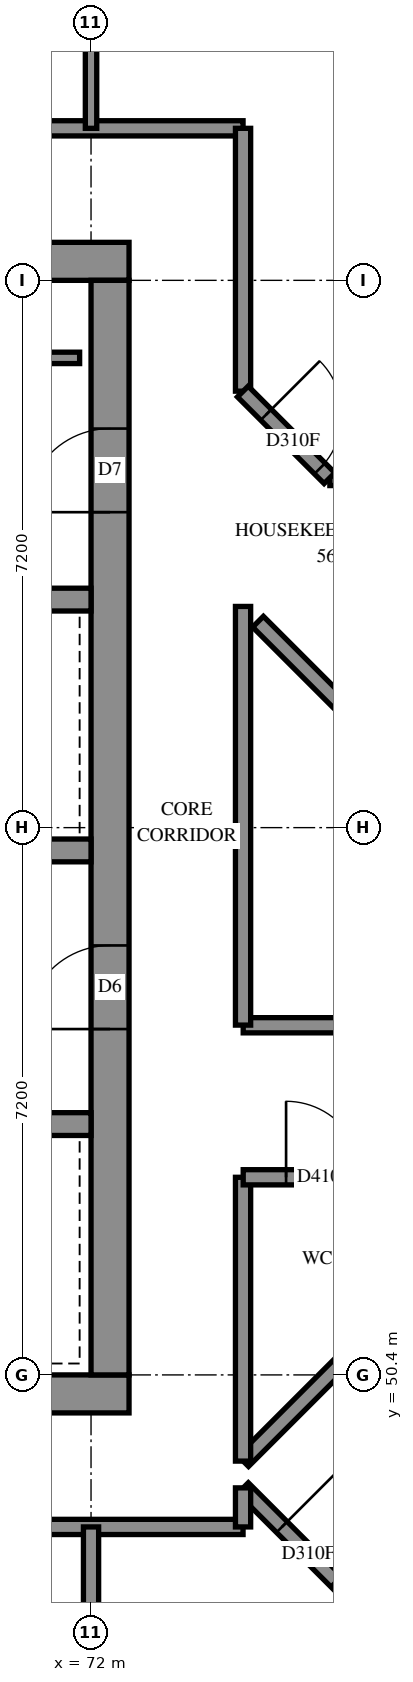
"""IFC4 building model, lengths in metres.
Left out: names, types, materials, properties, quantities, classifications, styles, units other than length and angle.
Written with IfcOpenShell. Run it as: python <this file> out.ifc"""

import sys

from ifc_helpers import new_model, si_unit, direction, frame, frame_2d, origin, place, context, subcontext, project, spatial, rectangle, extrude, element, fill, save


model = new_model("IFC4")
c1 = context("Model", 3, precision=1e-05, world=origin(), true_north=direction((0.0, 1.0)))
c2 = subcontext(c1, "Body", "Model", "MODEL_VIEW")
j1 = project(units=[si_unit("LENGTHUNIT", "METRE"), si_unit("PLANEANGLEUNIT", "RADIAN")], contexts=[c1])
p1 = place(None, origin())
s1 = spatial("IfcSite", under=j1, at=p1, CompositionType="ELEMENT")
p2 = place(p1, origin())
s2 = spatial("IfcBuilding", under=s1, at=p2, CompositionType="ELEMENT")
p3 = place(p2, frame((0.0, 0.0, 206.6)))
s3 = spatial("IfcBuildingStorey", under=s2, at=p3, CompositionType="ELEMENT", Elevation=206.6)
p4 = place(p3, frame((57.1, 50.15, -0.3), z_axis=(0.0, 0.0, 1.0), x_axis=(1.0, 0.0, 0.0)))
e1 = element("IfcWall", 1, at=p4, inside=s3, PredefinedType="SHEAR", context=c2, shape_type="SweptSolid", body=[
    extrude(rectangle(XDim=15.4, YDim=0.5, at=frame_2d((7.7, 0.0))), origin(), (0.0, 0.0, 1.0), 2.7),
])
p5 = place(p3, frame((57.1, 65.05, -0.3), z_axis=(0.0, 0.0, 1.0), x_axis=(1.0, 0.0, 0.0)))
e2 = element("IfcWall", 2, at=p5, inside=s3, PredefinedType="SHEAR", context=c2, shape_type="SweptSolid", body=[
    extrude(rectangle(XDim=15.4, YDim=0.5, at=frame_2d((7.7, 0.0))), origin(), (0.0, 0.0, 1.0), 2.7),
])
p6 = place(p5, frame((10.5, 0.0, 0.3)))
e3 = element("IfcOpeningElement", 3, at=p6, cuts=e2, PredefinedType="OPENING", context=c2, shape_type="SweptSolid", body=[
    extrude(rectangle(XDim=0.8, YDim=2.1, at=frame_2d((0.4, 1.05))), frame((0.0, 0.26, 0.0), z_axis=(0.0, -1.0, 0.0), x_axis=(1.0, 0.0, 0.0)), (0.0, 0.0, 1.0), 0.52),
])
p7 = place(p3, frame((72.25, 50.4, -0.3), z_axis=(0.0, 0.0, 1.0), x_axis=(0.0, 1.0, 0.0)))
e4 = element("IfcWall", 4, at=p7, inside=s3, PredefinedType="SHEAR", context=c2, shape_type="SweptSolid", body=[
    extrude(rectangle(XDim=14.4, YDim=0.5, at=frame_2d((7.2, 0.0))), origin(), (0.0, 0.0, 1.0), 2.7),
])
p8 = place(p7, frame((4.55, 0.0, 0.3)))
e5 = element("IfcOpeningElement", 5, at=p8, cuts=e4, PredefinedType="OPENING", context=c2, shape_type="SweptSolid", body=[
    extrude(rectangle(XDim=1.1, YDim=2.1, at=frame_2d((0.55, 1.05))), frame((0.0, 0.26, 0.0), z_axis=(0.0, -1.0, 0.0), x_axis=(1.0, 0.0, 0.0)), (0.0, 0.0, 1.0), 0.52),
])
p9 = place(p7, frame((11.35, 0.0, 0.3)))
e6 = element("IfcOpeningElement", 6, at=p9, cuts=e4, PredefinedType="OPENING", context=c2, shape_type="SweptSolid", body=[
    extrude(rectangle(XDim=1.1, YDim=2.1, at=frame_2d((0.55, 1.05))), frame((0.0, 0.26, 0.0), z_axis=(0.0, -1.0, 0.0), x_axis=(1.0, 0.0, 0.0)), (0.0, 0.0, 1.0), 0.52),
])
p10 = place(p3, frame((57.6, 53.7, 0.0), z_axis=(0.0, 0.0, 1.0), x_axis=(1.0, 0.0, 0.0)))
e7 = element("IfcWall", 7, at=p10, inside=s3, PredefinedType="SOLIDWALL", context=c2, shape_type="SweptSolid", body=[
    extrude(rectangle(XDim=14.4, YDim=0.3, at=frame_2d((7.2, 0.0))), origin(), (0.0, 0.0, 1.0), 3.1),
])
p11 = place(p10, frame((1.35, 0.0, 0.0)))
e8 = element("IfcOpeningElement", 8, at=p11, cuts=e7, PredefinedType="OPENING", context=c2, shape_type="SweptSolid", body=[
    extrude(rectangle(XDim=0.9, YDim=2.1, at=frame_2d((0.45, 1.05))), frame((0.0, 0.16, 0.0), z_axis=(0.0, -1.0, 0.0), x_axis=(1.0, 0.0, 0.0)), (0.0, 0.0, 1.0), 0.32),
])
p12 = place(p10, frame((4.95, 0.0, 0.0)))
e9 = element("IfcOpeningElement", 9, at=p12, cuts=e7, PredefinedType="OPENING", context=c2, shape_type="SweptSolid", body=[
    extrude(rectangle(XDim=0.9, YDim=2.1, at=frame_2d((0.45, 1.05))), frame((0.0, 0.16, 0.0), z_axis=(0.0, -1.0, 0.0), x_axis=(1.0, 0.0, 0.0)), (0.0, 0.0, 1.0), 0.32),
])
p13 = place(p10, frame((8.55, 0.0, 0.0)))
e10 = element("IfcOpeningElement", 10, at=p13, cuts=e7, PredefinedType="OPENING", context=c2, shape_type="SweptSolid", body=[
    extrude(rectangle(XDim=0.9, YDim=2.1, at=frame_2d((0.45, 1.05))), frame((0.0, 0.16, 0.0), z_axis=(0.0, -1.0, 0.0), x_axis=(1.0, 0.0, 0.0)), (0.0, 0.0, 1.0), 0.32),
])
p14 = place(p10, frame((12.05, 0.0, 0.0)))
e11 = element("IfcOpeningElement", 11, at=p14, cuts=e7, PredefinedType="OPENING", context=c2, shape_type="SweptSolid", body=[
    extrude(rectangle(XDim=1.1, YDim=2.1, at=frame_2d((0.55, 1.05))), frame((0.0, 0.16, 0.0), z_axis=(0.0, -1.0, 0.0), x_axis=(1.0, 0.0, 0.0)), (0.0, 0.0, 1.0), 0.32),
])
p15 = place(p3, frame((57.6, 57.3, 0.0), z_axis=(0.0, 0.0, 1.0), x_axis=(1.0, 0.0, 0.0)))
e12 = element("IfcWall", 12, at=p15, inside=s3, PredefinedType="SOLIDWALL", context=c2, shape_type="SweptSolid", body=[
    extrude(rectangle(XDim=14.4, YDim=0.3, at=frame_2d((7.2, 0.0))), origin(), (0.0, 0.0, 1.0), 3.1),
])
p16 = place(p15, frame((1.25, 0.0, 0.0)))
e13 = element("IfcOpeningElement", 13, at=p16, cuts=e12, PredefinedType="OPENING", context=c2, shape_type="SweptSolid", body=[
    extrude(rectangle(XDim=1.1, YDim=2.1, at=frame_2d((0.55, 1.05))), frame((0.0, 0.16, 0.0), z_axis=(0.0, -1.0, 0.0), x_axis=(1.0, 0.0, 0.0)), (0.0, 0.0, 1.0), 0.32),
])
p17 = place(p15, frame((4.85, 0.0, 0.0)))
e14 = element("IfcOpeningElement", 14, at=p17, cuts=e12, PredefinedType="OPENING", context=c2, shape_type="SweptSolid", body=[
    extrude(rectangle(XDim=1.1, YDim=2.1, at=frame_2d((0.55, 1.05))), frame((0.0, 0.16, 0.0), z_axis=(0.0, -1.0, 0.0), x_axis=(1.0, 0.0, 0.0)), (0.0, 0.0, 1.0), 0.32),
])
p18 = place(p15, frame((8.45, 0.0, 0.0)))
e15 = element("IfcOpeningElement", 15, at=p18, cuts=e12, PredefinedType="OPENING", context=c2, shape_type="SweptSolid", body=[
    extrude(rectangle(XDim=1.1, YDim=2.1, at=frame_2d((0.55, 1.05))), frame((0.0, 0.16, 0.0), z_axis=(0.0, -1.0, 0.0), x_axis=(1.0, 0.0, 0.0)), (0.0, 0.0, 1.0), 0.32),
])
p19 = place(p15, frame((12.05, 0.0, 0.0)))
e16 = element("IfcOpeningElement", 16, at=p19, cuts=e12, PredefinedType="OPENING", context=c2, shape_type="SweptSolid", body=[
    extrude(rectangle(XDim=1.1, YDim=2.1, at=frame_2d((0.55, 1.05))), frame((0.0, 0.16, 0.0), z_axis=(0.0, -1.0, 0.0), x_axis=(1.0, 0.0, 0.0)), (0.0, 0.0, 1.0), 0.32),
])
p20 = place(p3, frame((64.8, 60.6, 0.0), z_axis=(0.0, 0.0, 1.0), x_axis=(1.0, 0.0, 0.0)))
e17 = element("IfcWall", 17, at=p20, inside=s3, PredefinedType="SOLIDWALL", context=c2, shape_type="SweptSolid", body=[
    extrude(rectangle(XDim=7.2, YDim=0.3, at=frame_2d((3.6, 0.0))), origin(), (0.0, 0.0, 1.0), 3.1),
])
p21 = place(p3, frame((64.95, 63.78, 0.0), z_axis=(0.0, 0.0, 1.0), x_axis=(1.0, 0.0, 0.0)))
e18 = element("IfcWall", 18, at=p21, inside=s3, PredefinedType="PARTITIONING", context=c2, shape_type="SweptSolid", body=[
    extrude(rectangle(XDim=6.9, YDim=0.15, at=frame_2d((3.45, 0.0))), origin(), (0.0, 0.0, 1.0), 3.1),
])
p22 = place(p3, frame((55.6, 48.4, 0.0), z_axis=(0.0, 0.0, 1.0), x_axis=(1.0, 0.0, 0.0)))
e19 = element("IfcWall", 19, at=p22, inside=s3, PredefinedType="PARTITIONING", context=c2, shape_type="SweptSolid", body=[
    extrude(rectangle(XDim=18.4, YDim=0.2, at=frame_2d((9.2, 0.0))), origin(), (0.0, 0.0, 1.0), 3.1),
])
p23 = place(p22, frame((5.862, 0.0, 0.0)))
e20 = element("IfcOpeningElement", 20, at=p23, cuts=e19, PredefinedType="OPENING", context=c2, shape_type="SweptSolid", body=[
    extrude(rectangle(XDim=1.0, YDim=2.1, at=frame_2d((0.5, 1.05))), frame((0.0, 0.11, 0.0), z_axis=(0.0, -1.0, 0.0), x_axis=(1.0, 0.0, 0.0)), (0.0, 0.0, 1.0), 0.22),
])
p24 = place(p22, frame((13.099, 0.0, 0.0)))
e21 = element("IfcOpeningElement", 21, at=p24, cuts=e19, PredefinedType="OPENING", context=c2, shape_type="SweptSolid", body=[
    extrude(rectangle(XDim=0.9, YDim=2.1, at=frame_2d((0.45, 1.05))), frame((0.0, 0.11, 0.0), z_axis=(0.0, -1.0, 0.0), x_axis=(1.0, 0.0, 0.0)), (0.0, 0.0, 1.0), 0.22),
])
p25 = place(p3, frame((55.6, 66.8, 0.0), z_axis=(0.0, 0.0, 1.0), x_axis=(1.0, 0.0, 0.0)))
e22 = element("IfcWall", 22, at=p25, inside=s3, PredefinedType="PARTITIONING", context=c2, shape_type="SweptSolid", body=[
    extrude(rectangle(XDim=18.4, YDim=0.2, at=frame_2d((9.2, 0.0))), origin(), (0.0, 0.0, 1.0), 3.1),
])
p26 = place(p25, frame((4.25, 0.0, 0.0)))
e23 = element("IfcOpeningElement", 23, at=p26, cuts=e22, PredefinedType="OPENING", context=c2, shape_type="SweptSolid", body=[
    extrude(rectangle(XDim=0.9, YDim=2.1, at=frame_2d((0.45, 1.05))), frame((0.0, 0.11, 0.0), z_axis=(0.0, -1.0, 0.0), x_axis=(1.0, 0.0, 0.0)), (0.0, 0.0, 1.0), 0.22),
])
p27 = place(p25, frame((7.974, 0.0, 0.0)))
e24 = element("IfcOpeningElement", 24, at=p27, cuts=e22, PredefinedType="OPENING", context=c2, shape_type="SweptSolid", body=[
    extrude(rectangle(XDim=1.0, YDim=2.1, at=frame_2d((0.5, 1.05))), frame((0.0, 0.11, 0.0), z_axis=(0.0, -1.0, 0.0), x_axis=(1.0, 0.0, 0.0)), (0.0, 0.0, 1.0), 0.22),
])
p28 = place(p25, frame((13.2, 0.0, 0.0)))
e25 = element("IfcOpeningElement", 25, at=p28, cuts=e22, PredefinedType="OPENING", context=c2, shape_type="SweptSolid", body=[
    extrude(rectangle(XDim=0.9, YDim=2.1, at=frame_2d((0.45, 1.05))), frame((0.0, 0.11, 0.0), z_axis=(0.0, -1.0, 0.0), x_axis=(1.0, 0.0, 0.0)), (0.0, 0.0, 1.0), 0.22),
])
p29 = place(p3, frame((73.999, 48.911, 0.0), z_axis=(0.0, 0.0, 1.0), x_axis=(0.7071067812, -0.7071067812, 0.0)))
e26 = element("IfcWall", 26, at=p29, inside=s3, PredefinedType="PARTITIONING", context=c2, shape_type="SweptSolid", body=[
    extrude(rectangle(XDim=5.745, YDim=0.2, at=frame_2d((2.872, 0.0))), origin(), (0.0, 0.0, 1.0), 3.1),
])
p30 = place(p29, frame((0.724, 0.0, 0.0)))
e27 = element("IfcOpeningElement", 27, at=p30, cuts=e26, PredefinedType="OPENING", context=c2, shape_type="SweptSolid", body=[
    extrude(rectangle(XDim=1.0, YDim=2.1, at=frame_2d((0.5, 1.05))), frame((0.0, 0.11, 0.0), z_axis=(0.0, -1.0, 0.0), x_axis=(1.0, 0.0, 0.0)), (0.0, 0.0, 1.0), 0.22),
])
p31 = place(p3, frame((74.002, 55.0, 0.0), z_axis=(0.0, 0.0, 1.0), x_axis=(1.0, 0.0, 0.0)))
e28 = element("IfcWall", 28, at=p31, inside=s3, PredefinedType="PARTITIONING", context=c2, shape_type="SweptSolid", body=[
    extrude(rectangle(XDim=5.508, YDim=0.2, at=frame_2d((2.754, 0.0))), origin(), (0.0, 0.0, 1.0), 3.1),
])
p32 = place(p31, frame((1.51, 0.0, 0.0)))
e29 = element("IfcOpeningElement", 29, at=p32, cuts=e28, PredefinedType="OPENING", context=c2, shape_type="SweptSolid", body=[
    extrude(rectangle(XDim=1.0, YDim=2.1, at=frame_2d((0.5, 1.05))), frame((0.0, 0.11, 0.0), z_axis=(0.0, -1.0, 0.0), x_axis=(1.0, 0.0, 0.0)), (0.0, 0.0, 1.0), 0.22),
])
p33 = place(p3, frame((74.0, 55.002, 0.0), z_axis=(0.0, 0.0, 1.0), x_axis=(0.0, 1.0, 0.0)))
e30 = element("IfcWall", 30, at=p33, inside=s3, PredefinedType="PARTITIONING", context=c2, shape_type="SweptSolid", body=[
    extrude(rectangle(XDim=5.508, YDim=0.2, at=frame_2d((2.754, 0.0))), origin(), (0.0, 0.0, 1.0), 3.1),
])
p34 = place(p3, frame((74.001, 49.267, 0.0), z_axis=(0.0, 0.0, 1.0), x_axis=(0.7071067812, 0.7071067812, 0.0)))
e31 = element("IfcWall", 31, at=p34, inside=s3, PredefinedType="PARTITIONING", context=c2, shape_type="SweptSolid", body=[
    extrude(rectangle(XDim=5.278, YDim=0.2, at=frame_2d((2.639, 0.0))), origin(), (0.0, 0.0, 1.0), 3.1),
])
p35 = place(p3, frame((72.0, 43.6, 0.0), z_axis=(0.0, 0.0, 1.0), x_axis=(0.0, 1.0, 0.0)))
e32 = element("IfcWall", 32, at=p35, inside=s3, PredefinedType="PARTITIONING", context=c2, shape_type="SweptSolid", body=[
    extrude(rectangle(XDim=4.8, YDim=0.2, at=frame_2d((2.4, 0.0))), origin(), (0.0, 0.0, 1.0), 3.1),
])
p36 = place(p3, frame((74.197, 60.309, 0.0), z_axis=(0.0, 0.0, 1.0), x_axis=(0.7071067812, -0.7071067812, 0.0)))
e33 = element("IfcWall", 33, at=p36, inside=s3, PredefinedType="PARTITIONING", context=c2, shape_type="SweptSolid", body=[
    extrude(rectangle(XDim=4.738, YDim=0.2, at=frame_2d((2.369, 0.0))), origin(), (0.0, 0.0, 1.0), 3.1),
])
p37 = place(p3, frame((75.142, 62.2, 0.0), z_axis=(0.0, 0.0, 1.0), x_axis=(1.0, 0.0, 0.0)))
e34 = element("IfcWall", 34, at=p37, inside=s3, PredefinedType="PARTITIONING", context=c2, shape_type="SweptSolid", body=[
    extrude(rectangle(XDim=4.058, YDim=0.2, at=frame_2d((2.029, 0.0))), origin(), (0.0, 0.0, 1.0), 3.1),
])
p38 = place(p37, frame((2.808, 0.0, 0.0)))
e35 = element("IfcOpeningElement", 35, at=p38, cuts=e34, PredefinedType="OPENING", context=c2, shape_type="SweptSolid", body=[
    extrude(rectangle(XDim=0.9, YDim=2.1, at=frame_2d((0.45, 1.05))), frame((0.0, 0.11, 0.0), z_axis=(0.0, -1.0, 0.0), x_axis=(1.0, 0.0, 0.0)), (0.0, 0.0, 1.0), 0.22),
])
p39 = place(p3, frame((74.0, 49.266, 0.0), z_axis=(0.0, 0.0, 1.0), x_axis=(0.0, 1.0, 0.0)))
e36 = element("IfcWall", 36, at=p39, inside=s3, PredefinedType="PARTITIONING", context=c2, shape_type="SweptSolid", body=[
    extrude(rectangle(XDim=3.734, YDim=0.2, at=frame_2d((1.867, 0.0))), origin(), (0.0, 0.0, 1.0), 3.1),
])
p40 = place(p3, frame((74.002, 53.0, 0.0), z_axis=(0.0, 0.0, 1.0), x_axis=(1.0, 0.0, 0.0)))
e37 = element("IfcWall", 37, at=p40, inside=s3, PredefinedType="PARTITIONING", context=c2, shape_type="SweptSolid", body=[
    extrude(rectangle(XDim=3.732, YDim=0.2, at=frame_2d((1.866, 0.0))), origin(), (0.0, 0.0, 1.0), 3.1),
])
p41 = place(p40, frame((0.564, 0.0, 0.0)))
e38 = element("IfcOpeningElement", 38, at=p41, cuts=e37, PredefinedType="OPENING", context=c2, shape_type="SweptSolid", body=[
    extrude(rectangle(XDim=1.0, YDim=2.1, at=frame_2d((0.5, 1.05))), frame((0.0, 0.11, 0.0), z_axis=(0.0, -1.0, 0.0), x_axis=(1.0, 0.0, 0.0)), (0.0, 0.0, 1.0), 0.22),
])
p42 = place(p3, frame((74.0, 63.342, 0.0), z_axis=(0.0, 0.0, 1.0), x_axis=(0.0, 1.0, 0.0)))
e39 = element("IfcWall", 39, at=p42, inside=s3, PredefinedType="PARTITIONING", context=c2, shape_type="SweptSolid", body=[
    extrude(rectangle(XDim=3.458, YDim=0.2, at=frame_2d((1.729, 0.0))), origin(), (0.0, 0.0, 1.0), 3.1),
])
p43 = place(p3, frame((72.0, 66.8, 0.0), z_axis=(0.0, 0.0, 1.0), x_axis=(0.0, 1.0, 0.0)))
e40 = element("IfcWall", 40, at=p43, inside=s3, PredefinedType="PARTITIONING", context=c2, shape_type="SweptSolid", body=[
    extrude(rectangle(XDim=2.4, YDim=0.15, at=frame_2d((1.2, 0.0))), origin(), (0.0, 0.0, 1.0), 3.1),
])
p44 = place(p3, frame((73.997, 63.337, 0.0), z_axis=(0.0, 0.0, 1.0), x_axis=(0.7071067812, -0.7071067812, 0.0)))
e41 = element("IfcWall", 41, at=p44, inside=s3, PredefinedType="PARTITIONING", context=c2, shape_type="SweptSolid", body=[
    extrude(rectangle(XDim=1.612, YDim=0.2, at=frame_2d((0.806, 0.0))), origin(), (0.0, 0.0, 1.0), 3.1),
])
p45 = place(p44, frame((0.432, 0.0, 0.0)))
e42 = element("IfcOpeningElement", 42, at=p45, cuts=e41, PredefinedType="OPENING", context=c2, shape_type="SweptSolid", body=[
    extrude(rectangle(XDim=1.0, YDim=2.1, at=frame_2d((0.5, 1.05))), frame((0.0, 0.11, 0.0), z_axis=(0.0, -1.0, 0.0), x_axis=(1.0, 0.0, 0.0)), (0.0, 0.0, 1.0), 0.22),
])
p46 = place(p3, frame((74.0, 48.4, 0.0), z_axis=(0.0, 0.0, 1.0), x_axis=(0.0, 1.0, 0.0)))
e43 = element("IfcWall", 43, at=p46, inside=s3, PredefinedType="PARTITIONING", context=c2, shape_type="SweptSolid", body=[
    extrude(rectangle(XDim=0.514, YDim=0.2, at=frame_2d((0.257, 0.0))), origin(), (0.0, 0.0, 1.0), 3.1),
])
p47 = place(p8, origin())
e44 = element("IfcDoor", 44, at=p47, inside=s3, OperationType="DOUBLE_DOOR_SINGLE_SWING", PredefinedType="DOOR", context=c2, shape_type="SweptSolid", body=[
    extrude(rectangle(XDim=1.1, YDim=2.1, at=frame_2d((0.55, 1.05))), frame((0.0, 0.025, 0.0), z_axis=(0.0, -1.0, 0.0), x_axis=(1.0, 0.0, 0.0)), (0.0, 0.0, 1.0), 0.05),
])
fill(e5, e44)
p48 = place(p9, origin())
e45 = element("IfcDoor", 45, at=p48, inside=s3, OperationType="SINGLE_SWING_RIGHT", PredefinedType="DOOR", context=c2, shape_type="SweptSolid", body=[
    extrude(rectangle(XDim=1.1, YDim=2.1, at=frame_2d((0.55, 1.05))), frame((0.0, 0.025, 0.0), z_axis=(0.0, -1.0, 0.0), x_axis=(1.0, 0.0, 0.0)), (0.0, 0.0, 1.0), 0.05),
])
fill(e6, e45)
p49 = place(p41, origin())
e46 = element("IfcDoor", 46, at=p49, inside=s3, OperationType="SINGLE_SWING_RIGHT", PredefinedType="DOOR", context=c2, shape_type="SweptSolid", body=[
    extrude(rectangle(XDim=1.0, YDim=2.1, at=frame_2d((0.5, 1.05))), frame((0.0, 0.025, 0.0), z_axis=(0.0, -1.0, 0.0), x_axis=(1.0, 0.0, 0.0)), (0.0, 0.0, 1.0), 0.05),
])
fill(e38, e46)
p50 = place(p45, origin())
e47 = element("IfcDoor", 47, at=p50, inside=s3, OperationType="SINGLE_SWING_RIGHT", PredefinedType="DOOR", context=c2, shape_type="SweptSolid", body=[
    extrude(rectangle(XDim=1.0, YDim=2.1, at=frame_2d((0.5, 1.05))), frame((0.0, 0.025, 0.0), z_axis=(0.0, -1.0, 0.0), x_axis=(1.0, 0.0, 0.0)), (0.0, 0.0, 1.0), 0.05),
])
fill(e42, e47)
p51 = place(p30, origin())
e48 = element("IfcDoor", 48, at=p51, inside=s3, OperationType="SINGLE_SWING_LEFT", PredefinedType="DOOR", context=c2, shape_type="SweptSolid", body=[
    extrude(rectangle(XDim=1.0, YDim=2.1, at=frame_2d((0.5, 1.05))), frame((0.0, 0.025, 0.0), z_axis=(0.0, -1.0, 0.0), x_axis=(1.0, 0.0, 0.0)), (0.0, 0.0, 1.0), 0.05),
])
fill(e27, e48)
save(model, sys.argv[1])
